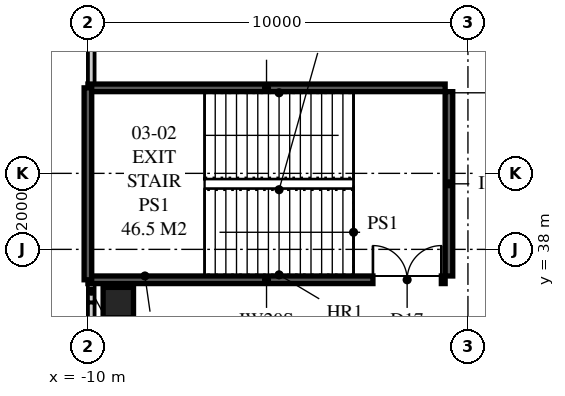
"""IFC4 building model, lengths in metres.
Left out: names, types, materials, properties, quantities, classifications, styles, units other than length and angle.
Written with IfcOpenShell. Run it as: python <this file> out.ifc"""

import sys

from ifc_helpers import new_model, si_unit, direction, frame, frame_2d, origin, origin_2d, place, context, subcontext, project, spatial, rectangle, extrude, element, fill, save


model = new_model("IFC4")
c1 = context("Model", 3, precision=1e-05, world=origin(), true_north=direction((0.0, 1.0)))
c2 = subcontext(c1, "Body", "Model", "MODEL_VIEW")
j1 = project(units=[si_unit("LENGTHUNIT", "METRE"), si_unit("PLANEANGLEUNIT", "RADIAN")], contexts=[c1])
p1 = place(None, origin())
s1 = spatial("IfcSite", under=j1, at=p1, CompositionType="ELEMENT")
p2 = place(p1, origin())
s2 = spatial("IfcBuilding", under=s1, at=p2, CompositionType="ELEMENT")
p3 = place(p2, frame((0.0, 0.0, 16.0)))
s3 = spatial("IfcBuildingStorey", under=s2, at=p3, CompositionType="ELEMENT", Elevation=16.0)
p4 = place(p3, frame((-9.2, 36.6, 0.0), z_axis=(0.0, 0.0, 1.0), x_axis=(1.0, 0.0, 0.0)))
e1 = element("IfcColumn", 1, at=p4, inside=s3, PredefinedType="COLUMN", context=c2, shape_type="SweptSolid", body=[
    extrude(rectangle(XDim=0.8, YDim=0.8, at=origin_2d()), origin(), (0.0, 0.0, 1.0), 5.0),
])
p5 = place(p3, frame((-10.0, 42.25, 0.0), z_axis=(0.0, 0.0, 1.0), x_axis=(0.0, -1.0, 0.0)))
e2 = element("IfcWall", 2, at=p5, inside=s3, PredefinedType="SOLIDWALL", context=c2, shape_type="SweptSolid", body=[
    extrude(rectangle(XDim=5.05, YDim=0.2, at=frame_2d((2.525, 0.0))), origin(), (0.0, 0.0, 1.0), 5.0),
])
p6 = place(p3, frame((-9.913, 45.913, 0.0), z_axis=(0.0, 0.0, 1.0), x_axis=(0.0, -1.0, 0.0)))
e3 = element("IfcWall", 3, at=p6, inside=s3, PredefinedType="SOLIDWALL", context=c2, shape_type="SweptSolid", body=[
    extrude(rectangle(XDim=3.663, YDim=0.175, at=frame_2d((1.831, 0.0))), origin(), (0.0, 0.0, 1.0), 4.72),
])
p7 = place(p3, frame((-9.913, 37.2, 0.0), z_axis=(0.0, 0.0, 1.0), x_axis=(0.0, -1.0, 0.0)))
e4 = element("IfcWall", 4, at=p7, inside=s3, PredefinedType="SOLIDWALL", context=c2, shape_type="SweptSolid", body=[
    extrude(rectangle(XDim=0.6, YDim=0.175, at=frame_2d((0.3, 0.0))), origin(), (0.0, 0.0, 1.0), 4.72),
])
p8 = place(p3, frame((-9.913, 36.6, 0.0), z_axis=(0.0, 0.0, 1.0), x_axis=(0.0, -1.0, 0.0)))
e5 = element("IfcWall", 5, at=p8, inside=s3, PredefinedType="SOLIDWALL", context=c2, shape_type="SweptSolid", body=[
    extrude(rectangle(XDim=41.8, YDim=0.175, at=frame_2d((20.9, 0.0))), origin(), (0.0, 0.0, 1.0), 4.12),
])
p9 = place(p8, frame((1.326, 0.0, 0.9)))
e6 = element("IfcOpeningElement", 6, at=p9, cuts=e5, PredefinedType="OPENING", context=c2, shape_type="SweptSolid", body=[
    extrude(rectangle(XDim=2.4, YDim=2.4, at=frame_2d((1.2, 1.2))), frame((0.0, 0.097, 0.0), z_axis=(0.0, -1.0, 0.0), x_axis=(1.0, 0.0, 0.0)), (0.0, 0.0, 1.0), 0.195),
])
p10 = place(p8, frame((13.477, 0.0, 0.9)))
e7 = element("IfcOpeningElement", 7, at=p10, cuts=e5, PredefinedType="OPENING", context=c2, shape_type="SweptSolid", body=[
    extrude(rectangle(XDim=2.4, YDim=2.4, at=frame_2d((1.2, 1.2))), frame((0.0, 0.097, 0.0), z_axis=(0.0, -1.0, 0.0), x_axis=(1.0, 0.0, 0.0)), (0.0, 0.0, 1.0), 0.195),
])
p11 = place(p8, frame((19.781, 0.0, 0.9)))
e8 = element("IfcOpeningElement", 8, at=p11, cuts=e5, PredefinedType="OPENING", context=c2, shape_type="SweptSolid", body=[
    extrude(rectangle(XDim=2.4, YDim=2.4, at=frame_2d((1.2, 1.2))), frame((0.0, 0.097, 0.0), z_axis=(0.0, -1.0, 0.0), x_axis=(1.0, 0.0, 0.0)), (0.0, 0.0, 1.0), 0.195),
])
p12 = place(p8, frame((26.086, 0.0, 0.9)))
e9 = element("IfcOpeningElement", 9, at=p12, cuts=e5, PredefinedType="OPENING", context=c2, shape_type="SweptSolid", body=[
    extrude(rectangle(XDim=2.4, YDim=2.4, at=frame_2d((1.2, 1.2))), frame((0.0, 0.097, 0.0), z_axis=(0.0, -1.0, 0.0), x_axis=(1.0, 0.0, 0.0)), (0.0, 0.0, 1.0), 0.195),
])
p13 = place(p8, frame((38.237, 0.0, 0.9)))
e10 = element("IfcOpeningElement", 10, at=p13, cuts=e5, PredefinedType="OPENING", context=c2, shape_type="SweptSolid", body=[
    extrude(rectangle(XDim=2.4, YDim=2.4, at=frame_2d((1.2, 1.2))), frame((0.0, 0.097, 0.0), z_axis=(0.0, -1.0, 0.0), x_axis=(1.0, 0.0, 0.0)), (0.0, 0.0, 1.0), 0.195),
])
p14 = place(p3, frame((-10.0, 37.2, 0.0), z_axis=(0.0, 0.0, 1.0), x_axis=(1.0, 0.0, 0.0)))
e11 = element("IfcWall", 11, at=p14, inside=s3, PredefinedType="SOLIDWALL", context=c2, shape_type="SweptSolid", body=[
    extrude(rectangle(XDim=9.4, YDim=0.2, at=frame_2d((4.7, 0.0))), origin(), (0.0, 0.0, 1.0), 5.0),
])
p15 = place(p14, frame((7.5, 0.0, 0.0)))
e12 = element("IfcOpeningElement", 12, at=p15, cuts=e11, PredefinedType="OPENING", context=c2, shape_type="SweptSolid", body=[
    extrude(rectangle(XDim=1.8, YDim=2.2, at=frame_2d((0.9, 1.1))), frame((0.0, 0.11, 0.0), z_axis=(0.0, -1.0, 0.0), x_axis=(1.0, 0.0, 0.0)), (0.0, 0.0, 1.0), 0.22),
])
p16 = place(p3, frame((-0.5, 37.3, 0.0), z_axis=(0.0, 0.0, 1.0), x_axis=(0.0, 1.0, 0.0)))
e13 = element("IfcWall", 13, at=p16, inside=s3, PredefinedType="SOLIDWALL", context=c2, shape_type="SweptSolid", body=[
    extrude(rectangle(XDim=4.85, YDim=0.2, at=frame_2d((2.425, 0.0))), origin(), (0.0, 0.0, 1.0), 5.0),
])
p17 = place(p3, frame((-10.0, 42.25, 0.0), z_axis=(0.0, 0.0, 1.0), x_axis=(1.0, 0.0, 0.0)))
e14 = element("IfcWall", 14, at=p17, inside=s3, PredefinedType="SOLIDWALL", context=c2, shape_type="SweptSolid", body=[
    extrude(rectangle(XDim=9.4, YDim=0.2, at=frame_2d((4.7, 0.0))), origin(), (0.0, 0.0, 1.0), 5.0),
])
p18 = place(p15, origin())
e15 = element("IfcDoor", 15, at=p18, inside=s3, OperationType="DOUBLE_DOOR_SINGLE_SWING", PredefinedType="DOOR", context=c2, shape_type="SweptSolid", body=[
    extrude(rectangle(XDim=1.8, YDim=2.2, at=frame_2d((0.9, 1.1))), frame((0.0, 0.025, 0.0), z_axis=(0.0, -1.0, 0.0), x_axis=(1.0, 0.0, 0.0)), (0.0, 0.0, 1.0), 0.05),
])
fill(e12, e15)
save(model, sys.argv[1])
